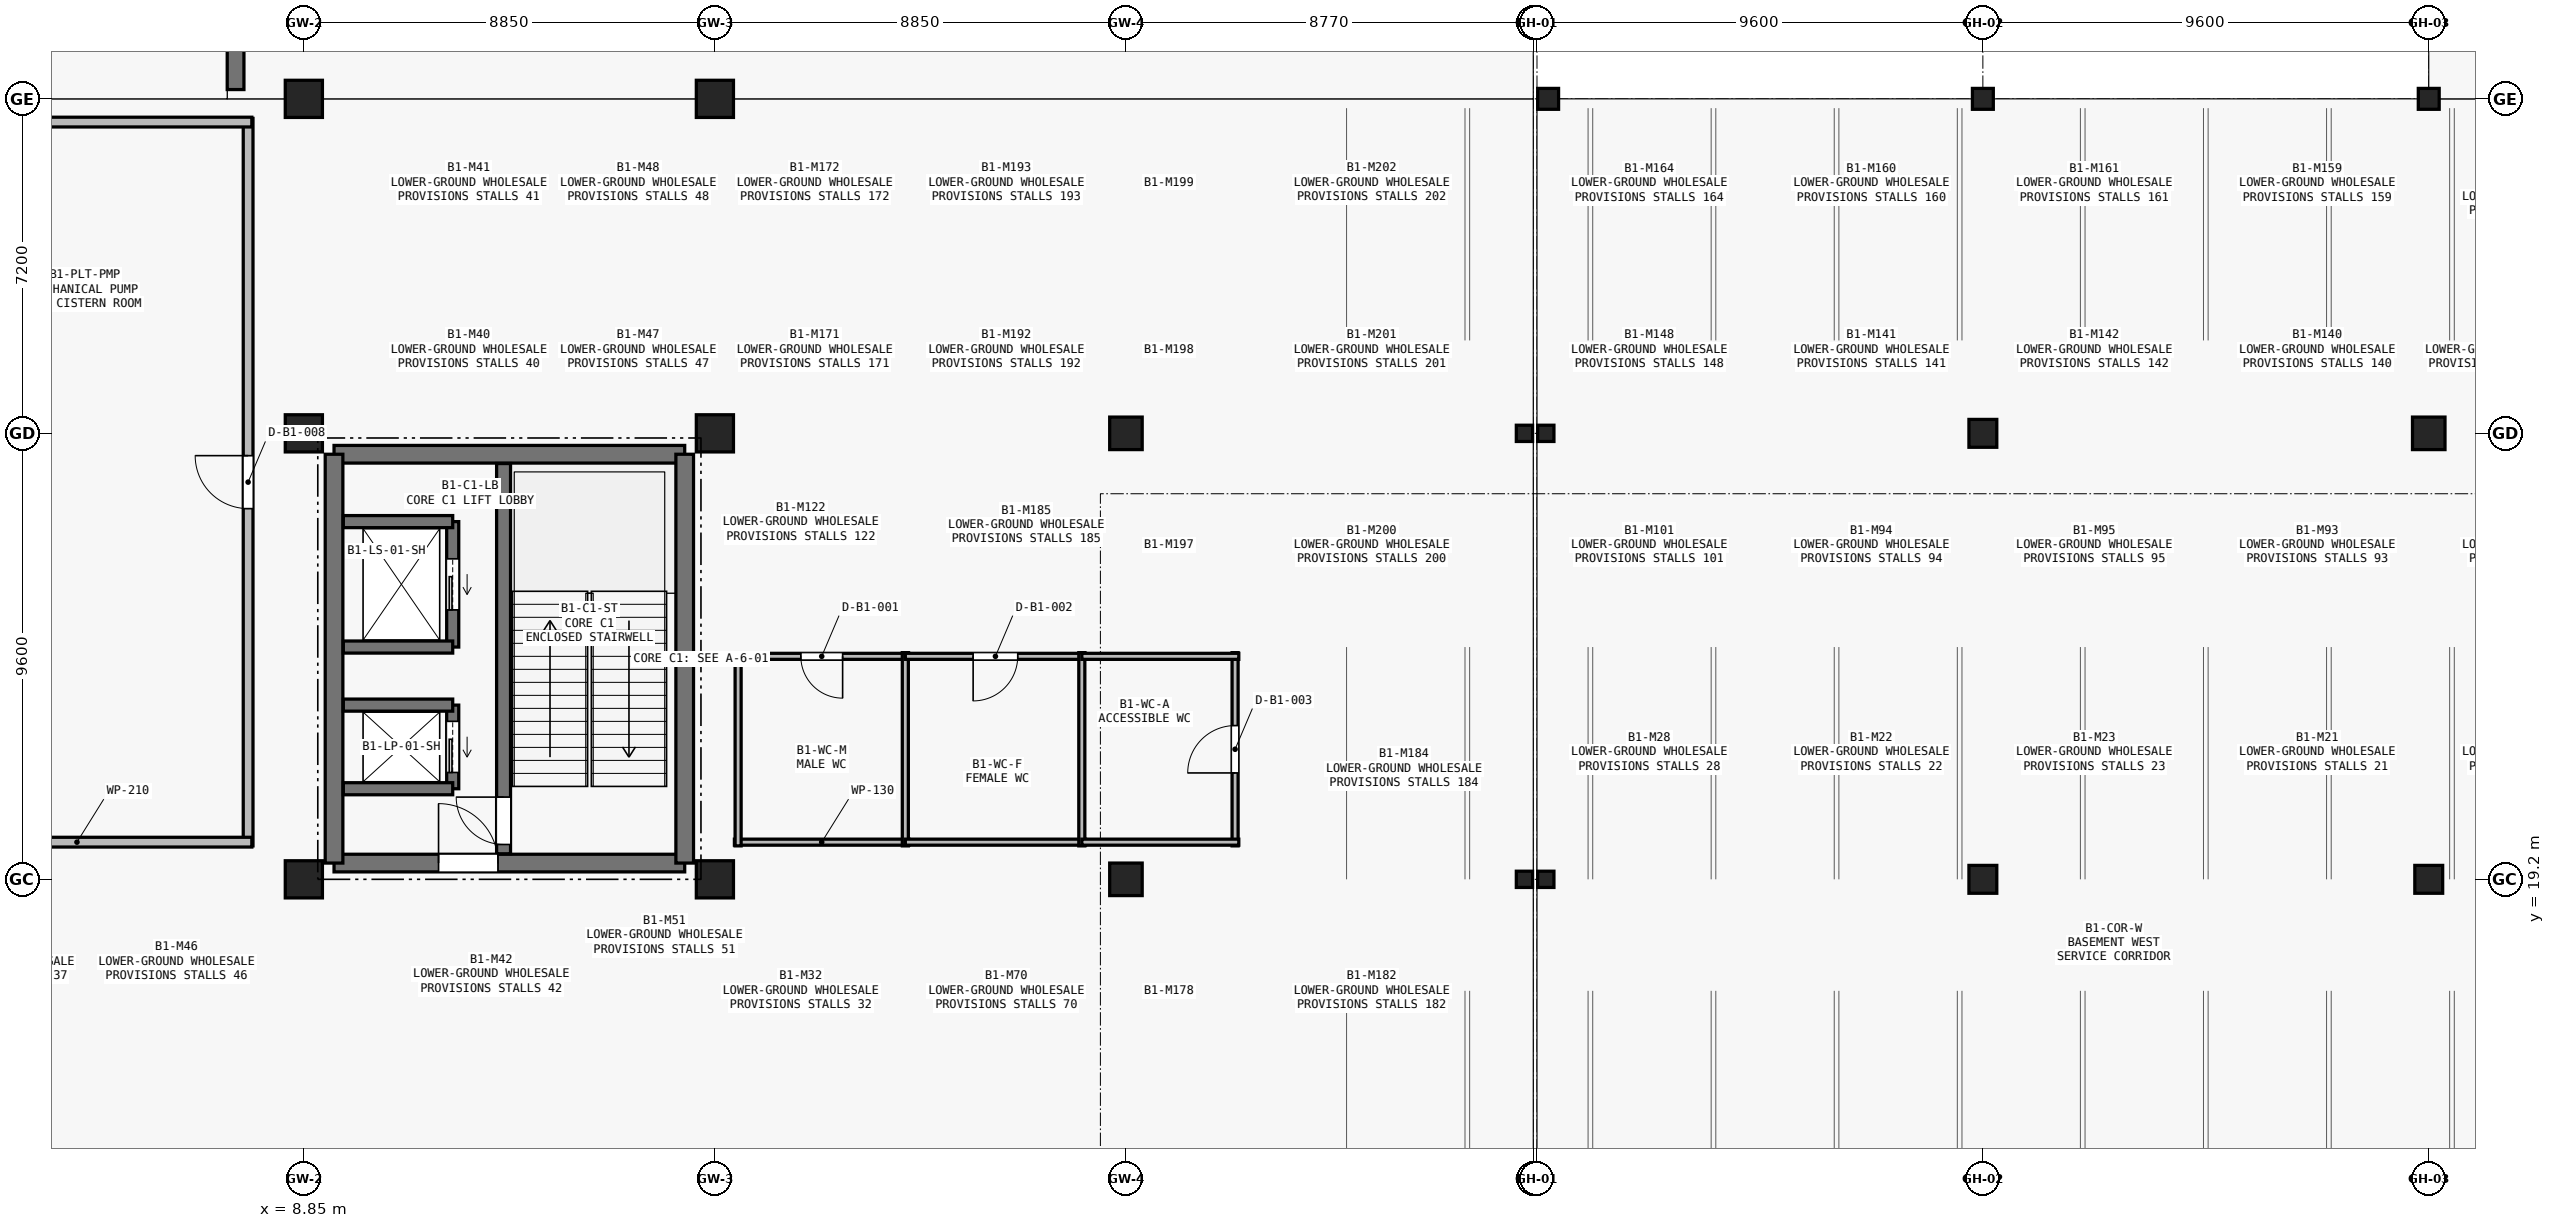
"""IFC4 building model, lengths in metres.
Left out: names, types, materials, properties, quantities, classifications, styles, units other than length and angle.
Written with IfcOpenShell. Run it as: python <this file> out.ifc"""

import sys

from ifc_helpers import new_model, si_unit, direction, frame, frame_2d, origin, origin_2d, place, context, subcontext, project, spatial, rectangle, circle, i_section, extrude, element, fill, save


model = new_model("IFC4")
c1 = context("Model", 3, precision=1e-05, world=origin(), true_north=direction((0.0, 1.0)))
c2 = subcontext(c1, "Body", "Model", "MODEL_VIEW")
j1 = project(units=[si_unit("LENGTHUNIT", "METRE"), si_unit("PLANEANGLEUNIT", "RADIAN")], contexts=[c1])
p1 = place(None, origin())
s1 = spatial("IfcSite", under=j1, at=p1, CompositionType="ELEMENT")
p2 = place(p1, origin())
s2 = spatial("IfcBuilding", under=s1, at=p2, CompositionType="ELEMENT")
p3 = place(p2, frame((0.0, 0.0, -5.4)))
s3 = spatial("IfcBuildingStorey", under=s2, at=p3, CompositionType="ELEMENT", Elevation=-5.4)
for number, where, z_axis, x_axis in (
    (1, (8.85, 19.2, 0.0), (0.0, 0.0, 1.0), (1.0, 0.0, 0.0)),
    (2, (8.85, 28.8, 0.0), (0.0, 0.0, 1.0), (1.0, 0.0, 0.0)),
    (3, (8.85, 36.0, 0.0), (0.0, 0.0, 1.0), (1.0, 0.0, 0.0)),
    (4, (17.7, 19.2, 0.0), (0.0, 0.0, 1.0), (1.0, 0.0, 0.0)),
    (5, (17.7, 28.8, 0.0), (0.0, 0.0, 1.0), (1.0, 0.0, 0.0)),
    (6, (17.7, 36.0, 0.0), (0.0, 0.0, 1.0), (1.0, 0.0, 0.0)),
):
    element("IfcColumn", number, at=place(p3, frame(where, z_axis=z_axis, x_axis=x_axis)), inside=s3, PredefinedType="COLUMN", context=c2, shape_type="SweptSolid", body=[
        extrude(rectangle(XDim=0.8, YDim=0.8, at=origin_2d()), origin(), (0.0, 0.0, 1.0), 5.4),
    ])
for number, where, z_axis, x_axis in (
    (7, (26.55, 19.2, 0.0), (0.0, 0.0, 1.0), (1.0, 0.0, 0.0)),
    (8, (26.55, 28.8, 0.0), (0.0, 0.0, 1.0), (1.0, 0.0, 0.0)),
):
    element("IfcColumn", number, at=place(p3, frame(where, z_axis=z_axis, x_axis=x_axis)), inside=s3, PredefinedType="COLUMN", context=c2, shape_type="SweptSolid", body=[
        extrude(rectangle(XDim=0.7, YDim=0.7, at=origin_2d()), origin(), (0.0, 0.0, 1.0), 5.4),
    ])
for number, where, z_axis, x_axis in (
    (9, (35.13, 19.2, 0.0), (0.0, 0.0, 1.0), (1.0, 0.0, 0.0)),
    (10, (35.13, 28.8, 0.0), (0.0, 0.0, 1.0), (1.0, 0.0, 0.0)),
    (11, (35.59, 19.2, 0.0), (0.0, 0.0, 1.0), (1.0, 0.0, 0.0)),
    (12, (35.59, 28.8, 0.0), (0.0, 0.0, 1.0), (1.0, 0.0, 0.0)),
):
    element("IfcColumn", number, at=place(p3, frame(where, z_axis=z_axis, x_axis=x_axis)), inside=s3, PredefinedType="COLUMN", context=c2, shape_type="SweptSolid", body=[
        extrude(i_section(OverallWidth=0.35, OverallDepth=0.35, WebThickness=0.012, FlangeThickness=0.019, FilletRadius=0.02, at=origin_2d()), origin(), (0.0, 0.0, 1.0), 5.4),
    ])
p4 = place(p3, frame((35.64, 36.0, 0.0), z_axis=(0.0, 0.0, 1.0), x_axis=(1.0, 0.0, 0.0)))
e13 = element("IfcColumn", 13, at=p4, inside=s3, PredefinedType="COLUMN", context=c2, shape_type="SweptSolid", body=[
    extrude(i_section(OverallWidth=0.45, OverallDepth=0.45, WebThickness=0.014, FlangeThickness=0.024, FilletRadius=0.024, at=origin_2d()), origin(), (0.0, 0.0, 1.0), 5.4),
])
for number, where, z_axis, x_axis in (
    (14, (45.0, 19.2, 0.0), (0.0, 0.0, 1.0), (1.0, 0.0, 0.0)),
    (15, (45.0, 28.8, 0.0), (0.0, 0.0, 1.0), (1.0, 0.0, 0.0)),
):
    element("IfcColumn", number, at=place(p3, frame(where, z_axis=z_axis, x_axis=x_axis)), inside=s3, PredefinedType="COLUMN", context=c2, shape_type="SweptSolid", body=[
        extrude(rectangle(XDim=0.6, YDim=0.6, at=origin_2d()), origin(), (0.0, 0.0, 1.0), 5.4),
    ])
p5 = place(p3, frame((45.0, 36.0, 0.0), z_axis=(0.0, 0.0, 1.0), x_axis=(1.0, 0.0, 0.0)))
e16 = element("IfcColumn", 16, at=p5, inside=s3, PredefinedType="COLUMN", context=c2, shape_type="SweptSolid", body=[
    extrude(i_section(OverallWidth=0.45, OverallDepth=0.45, WebThickness=0.014, FlangeThickness=0.024, FilletRadius=0.024, at=origin_2d()), origin(), (0.0, 0.0, 1.0), 5.4),
])
p6 = place(p3, frame((54.6, 19.2, 0.0), z_axis=(0.0, 0.0, 1.0), x_axis=(1.0, 0.0, 0.0)))
e17 = element("IfcColumn", 17, at=p6, inside=s3, PredefinedType="COLUMN", context=c2, shape_type="SweptSolid", body=[
    extrude(rectangle(XDim=0.6, YDim=0.6, at=origin_2d()), origin(), (0.0, 0.0, 1.0), 5.4),
])
p7 = place(p3, frame((54.6, 28.8, 0.0), z_axis=(0.0, 0.0, 1.0), x_axis=(1.0, 0.0, 0.0)))
e18 = element("IfcColumn", 18, at=p7, inside=s3, PredefinedType="COLUMN", context=c2, shape_type="SweptSolid", body=[
    extrude(circle(Radius=0.35, at=origin_2d()), origin(), (0.0, 0.0, 1.0), 5.4),
])
p8 = place(p3, frame((54.6, 36.0, 0.0), z_axis=(0.0, 0.0, 1.0), x_axis=(1.0, 0.0, 0.0)))
e19 = element("IfcColumn", 19, at=p8, inside=s3, PredefinedType="COLUMN", context=c2, shape_type="SweptSolid", body=[
    extrude(i_section(OverallWidth=0.45, OverallDepth=0.45, WebThickness=0.014, FlangeThickness=0.024, FilletRadius=0.024, at=origin_2d()), origin(), (0.0, 0.0, 1.0), 5.4),
])
p9 = place(p3, frame((7.38, 84.2, 0.0), z_axis=(0.0, 0.0, 1.0), x_axis=(0.0, -1.0, 0.0)))
e20 = element("IfcWall", 20, at=p9, inside=s3, PredefinedType="USERDEFINED", context=c2, shape_type="SweptSolid", body=[
    extrude(rectangle(XDim=48.0, YDim=0.36, at=frame_2d((24.0, 0.0))), origin(), (0.0, 0.0, 1.0), 9.0),
])
p10 = place(p3, frame((9.5, 19.55, 0.0), z_axis=(0.0, 0.0, 1.0), x_axis=(1.0, 0.0, 0.0)))
e21 = element("IfcWall", 21, at=p10, inside=s3, PredefinedType="SHEAR", context=c2, shape_type="SweptSolid", body=[
    extrude(rectangle(XDim=7.55, YDim=0.38, at=frame_2d((3.775, 0.0))), origin(), (0.0, 0.0, 1.0), 5.4),
])
p11 = place(p10, frame((2.25, 0.0, 0.0)))
e22 = element("IfcOpeningElement", 22, at=p11, cuts=e21, PredefinedType="OPENING", context=c2, shape_type="SweptSolid", body=[
    extrude(rectangle(XDim=1.28, YDim=2.15, at=frame_2d((0.64, 1.075))), frame((0.0, 0.2, 0.0), z_axis=(0.0, -1.0, 0.0), x_axis=(1.0, 0.0, 0.0)), (0.0, 0.0, 1.0), 0.4),
])
p12 = place(p3, frame((17.05, 28.35, 0.0), z_axis=(0.0, 0.0, 1.0), x_axis=(-1.0, 0.0, 0.0)))
e23 = element("IfcWall", 23, at=p12, inside=s3, PredefinedType="SHEAR", context=c2, shape_type="SweptSolid", body=[
    extrude(rectangle(XDim=7.55, YDim=0.38, at=frame_2d((3.775, 0.0))), origin(), (0.0, 0.0, 1.0), 5.4),
])
for number, where, z_axis, x_axis in (
    (24, (9.5, 28.35, 0.0), (0.0, 0.0, 1.0), (0.0, -1.0, 0.0)),
    (25, (17.05, 19.55, 0.0), (0.0, 0.0, 1.0), (0.0, 1.0, 0.0)),
):
    element("IfcWall", number, at=place(p3, frame(where, z_axis=z_axis, x_axis=x_axis)), inside=s3, PredefinedType="SHEAR", context=c2, shape_type="SweptSolid", body=[
        extrude(rectangle(XDim=8.8, YDim=0.38, at=frame_2d((4.4, 0.0))), origin(), (0.0, 0.0, 1.0), 5.4),
    ])
p13 = place(p3, frame((13.15, 19.75, 0.0), z_axis=(0.0, 0.0, 1.0), x_axis=(0.0, 1.0, 0.0)))
e26 = element("IfcWall", 26, at=p13, inside=s3, PredefinedType="SHEAR", context=c2, shape_type="SweptSolid", body=[
    extrude(rectangle(XDim=8.4, YDim=0.3, at=frame_2d((4.2, 0.0))), origin(), (0.0, 0.0, 1.0), 5.4),
])
p14 = place(p13, frame((0.2, 0.0, 0.0)))
e27 = element("IfcOpeningElement", 27, at=p14, cuts=e26, PredefinedType="OPENING", context=c2, shape_type="SweptSolid", body=[
    extrude(rectangle(XDim=1.02, YDim=2.1, at=frame_2d((0.51, 1.05))), frame((0.0, 0.16, 0.0), z_axis=(0.0, -1.0, 0.0), x_axis=(1.0, 0.0, 0.0)), (0.0, 0.0, 1.0), 0.32),
])
p15 = place(p3, frame((12.055, 21.15, 0.0), z_axis=(0.0, 0.0, 1.0), x_axis=(0.0, 1.0, 0.0)))
e28 = element("IfcWall", 28, at=p15, inside=s3, PredefinedType="SHEAR", context=c2, shape_type="SweptSolid", body=[
    extrude(rectangle(XDim=1.8, YDim=0.26, at=frame_2d((0.9, 0.0))), origin(), (0.0, 0.0, 1.0), 5.4),
])
p16 = place(p15, frame((0.35, 0.0, 0.0)))
e29 = element("IfcOpeningElement", 29, at=p16, cuts=e28, PredefinedType="OPENING", context=c2, shape_type="SweptSolid", body=[
    extrude(rectangle(XDim=1.1, YDim=2.15, at=frame_2d((0.55, 1.075))), frame((0.0, 0.14, 0.0), z_axis=(0.0, -1.0, 0.0), x_axis=(1.0, 0.0, 0.0)), (0.0, 0.0, 1.0), 0.28),
])
for number, where, z_axis, x_axis in (
    (30, (9.7, 21.15, 0.0), (0.0, 0.0, 1.0), (1.0, 0.0, 0.0)),
    (31, (9.7, 22.95, 0.0), (0.0, 0.0, 1.0), (1.0, 0.0, 0.0)),
):
    element("IfcWall", number, at=place(p3, frame(where, z_axis=z_axis, x_axis=x_axis)), inside=s3, PredefinedType="SHEAR", context=c2, shape_type="SweptSolid", body=[
        extrude(rectangle(XDim=2.355, YDim=0.26, at=frame_2d((1.177, 0.0))), origin(), (0.0, 0.0, 1.0), 5.4),
    ])
p17 = place(p3, frame((12.055, 24.2, 0.0), z_axis=(0.0, 0.0, 1.0), x_axis=(0.0, 1.0, 0.0)))
e32 = element("IfcWall", 32, at=p17, inside=s3, PredefinedType="SHEAR", context=c2, shape_type="SweptSolid", body=[
    extrude(rectangle(XDim=2.7, YDim=0.26, at=frame_2d((1.35, 0.0))), origin(), (0.0, 0.0, 1.0), 5.4),
])
p18 = place(p17, frame((0.8, 0.0, 0.0)))
e33 = element("IfcOpeningElement", 33, at=p18, cuts=e32, PredefinedType="OPENING", context=c2, shape_type="SweptSolid", body=[
    extrude(rectangle(XDim=1.1, YDim=2.15, at=frame_2d((0.55, 1.075))), frame((0.0, 0.14, 0.0), z_axis=(0.0, -1.0, 0.0), x_axis=(1.0, 0.0, 0.0)), (0.0, 0.0, 1.0), 0.28),
])
for number, where, z_axis, x_axis in (
    (34, (9.7, 24.2, 0.0), (0.0, 0.0, 1.0), (1.0, 0.0, 0.0)),
    (35, (9.7, 26.9, 0.0), (0.0, 0.0, 1.0), (1.0, 0.0, 0.0)),
):
    element("IfcWall", number, at=place(p3, frame(where, z_axis=z_axis, x_axis=x_axis)), inside=s3, PredefinedType="SHEAR", context=c2, shape_type="SweptSolid", body=[
        extrude(rectangle(XDim=2.355, YDim=0.26, at=frame_2d((1.177, 0.0))), origin(), (0.0, 0.0, 1.0), 5.4),
    ])
p19 = place(p3, frame((21.88, 24.0, 0.0), z_axis=(0.0, 0.0, 1.0), x_axis=(-1.0, 0.0, 0.0)))
e36 = element("IfcWall", 36, at=p19, inside=s3, PredefinedType="PARTITIONING", context=c2, shape_type="SweptSolid", body=[
    extrude(rectangle(XDim=3.76, YDim=0.13, at=frame_2d((1.88, 0.0))), origin(), (0.0, 0.0, 1.0), 4.92),
])
p20 = place(p19, frame((1.43, 0.0, 0.0)))
e37 = element("IfcOpeningElement", 37, at=p20, cuts=e36, PredefinedType="OPENING", context=c2, shape_type="SweptSolid", body=[
    extrude(rectangle(XDim=0.9, YDim=2.22, at=frame_2d((0.45, 1.11))), frame((0.0, 0.075, 0.0), z_axis=(0.0, -1.0, 0.0), x_axis=(1.0, 0.0, 0.0)), (0.0, 0.0, 1.0), 0.15),
])
p21 = place(p3, frame((18.12, 20.0, 0.0), z_axis=(0.0, 0.0, 1.0), x_axis=(1.0, 0.0, 0.0)))
e38 = element("IfcWall", 38, at=p21, inside=s3, PredefinedType="PARTITIONING", context=c2, shape_type="SweptSolid", body=[
    extrude(rectangle(XDim=3.76, YDim=0.13, at=frame_2d((1.88, 0.0))), origin(), (0.0, 0.0, 1.0), 4.92),
])
for number, where, z_axis, x_axis in (
    (39, (21.8, 19.92, 0.0), (0.0, 0.0, 1.0), (0.0, 1.0, 0.0)),
    (40, (18.2, 24.08, 0.0), (0.0, 0.0, 1.0), (0.0, -1.0, 0.0)),
):
    element("IfcWall", number, at=place(p3, frame(where, z_axis=z_axis, x_axis=x_axis)), inside=s3, PredefinedType="PARTITIONING", context=c2, shape_type="SweptSolid", body=[
        extrude(rectangle(XDim=4.16, YDim=0.13, at=frame_2d((2.08, 0.0))), origin(), (0.0, 0.0, 1.0), 4.92),
    ])
p22 = place(p3, frame((25.68, 24.0, 0.0), z_axis=(0.0, 0.0, 1.0), x_axis=(-1.0, 0.0, 0.0)))
e41 = element("IfcWall", 41, at=p22, inside=s3, PredefinedType="PARTITIONING", context=c2, shape_type="SweptSolid", body=[
    extrude(rectangle(XDim=3.88, YDim=0.13, at=frame_2d((1.94, 0.0))), origin(), (0.0, 0.0, 1.0), 4.92),
])
p23 = place(p22, frame((1.46, 0.0, 0.0)))
e42 = element("IfcOpeningElement", 42, at=p23, cuts=e41, PredefinedType="OPENING", context=c2, shape_type="SweptSolid", body=[
    extrude(rectangle(XDim=0.96, YDim=2.22, at=frame_2d((0.48, 1.11))), frame((0.0, 0.075, 0.0), z_axis=(0.0, -1.0, 0.0), x_axis=(1.0, 0.0, 0.0)), (0.0, 0.0, 1.0), 0.15),
])
p24 = place(p3, frame((21.8, 20.0, 0.0), z_axis=(0.0, 0.0, 1.0), x_axis=(1.0, 0.0, 0.0)))
e43 = element("IfcWall", 43, at=p24, inside=s3, PredefinedType="PARTITIONING", context=c2, shape_type="SweptSolid", body=[
    extrude(rectangle(XDim=3.88, YDim=0.13, at=frame_2d((1.94, 0.0))), origin(), (0.0, 0.0, 1.0), 4.92),
])
p25 = place(p3, frame((25.6, 19.92, 0.0), z_axis=(0.0, 0.0, 1.0), x_axis=(0.0, 1.0, 0.0)))
e44 = element("IfcWall", 44, at=p25, inside=s3, PredefinedType="PARTITIONING", context=c2, shape_type="SweptSolid", body=[
    extrude(rectangle(XDim=4.16, YDim=0.13, at=frame_2d((2.08, 0.0))), origin(), (0.0, 0.0, 1.0), 4.92),
])
p26 = place(p3, frame((28.9, 19.92, 0.0), z_axis=(0.0, 0.0, 1.0), x_axis=(0.0, 1.0, 0.0)))
e45 = element("IfcWall", 45, at=p26, inside=s3, PredefinedType="PARTITIONING", context=c2, shape_type="SweptSolid", body=[
    extrude(rectangle(XDim=4.16, YDim=0.13, at=frame_2d((2.08, 0.0))), origin(), (0.0, 0.0, 1.0), 4.92),
])
p27 = place(p26, frame((1.57, 0.0, 0.0)))
e46 = element("IfcOpeningElement", 46, at=p27, cuts=e45, PredefinedType="OPENING", context=c2, shape_type="SweptSolid", body=[
    extrude(rectangle(XDim=1.02, YDim=2.22, at=frame_2d((0.51, 1.11))), frame((0.0, 0.075, 0.0), z_axis=(0.0, -1.0, 0.0), x_axis=(1.0, 0.0, 0.0)), (0.0, 0.0, 1.0), 0.15),
])
for number, where, z_axis, x_axis in (
    (47, (28.98, 24.0, 0.0), (0.0, 0.0, 1.0), (-1.0, 0.0, 0.0)),
    (48, (25.6, 20.0, 0.0), (0.0, 0.0, 1.0), (1.0, 0.0, 0.0)),
):
    element("IfcWall", number, at=place(p3, frame(where, z_axis=z_axis, x_axis=x_axis)), inside=s3, PredefinedType="PARTITIONING", context=c2, shape_type="SweptSolid", body=[
        extrude(rectangle(XDim=3.38, YDim=0.13, at=frame_2d((1.69, 0.0))), origin(), (0.0, 0.0, 1.0), 4.92),
    ])
p28 = place(p3, frame((7.65, 19.92, 0.0), z_axis=(0.0, 0.0, 1.0), x_axis=(0.0, 1.0, 0.0)))
e49 = element("IfcWall", 49, at=p28, inside=s3, PredefinedType="PARTITIONING", context=c2, shape_type="SweptSolid", body=[
    extrude(rectangle(XDim=15.66, YDim=0.21, at=frame_2d((7.83, 0.0))), origin(), (0.0, 0.0, 1.0), 4.92),
])
p29 = place(p28, frame((7.26, 0.0, 0.0)))
e50 = element("IfcOpeningElement", 50, at=p29, cuts=e49, PredefinedType="OPENING", context=c2, shape_type="SweptSolid", body=[
    extrude(rectangle(XDim=1.14, YDim=2.1, at=frame_2d((0.57, 1.05))), frame((0.0, 0.115, 0.0), z_axis=(0.0, -1.0, 0.0), x_axis=(1.0, 0.0, 0.0)), (0.0, 0.0, 1.0), 0.23),
])
for number, where, z_axis, x_axis in (
    (51, (0.2, 20.0, 0.0), (0.0, 0.0, 1.0), (1.0, 0.0, 0.0)),
    (52, (7.73, 35.5, 0.0), (0.0, 0.0, 1.0), (-1.0, 0.0, 0.0)),
):
    element("IfcWall", number, at=place(p3, frame(where, z_axis=z_axis, x_axis=x_axis)), inside=s3, PredefinedType="PARTITIONING", context=c2, shape_type="SweptSolid", body=[
        extrude(rectangle(XDim=7.53, YDim=0.21, at=frame_2d((3.765, 0.0))), origin(), (0.0, 0.0, 1.0), 4.92),
    ])
p30 = place(p11, origin())
e53 = element("IfcDoor", 53, at=p30, inside=s3, OperationType="SINGLE_SWING_LEFT", PredefinedType="DOOR", context=c2, shape_type="SweptSolid", body=[
    extrude(rectangle(XDim=1.28, YDim=2.15, at=frame_2d((0.64, 1.075))), frame((0.0, 0.025, 0.0), z_axis=(0.0, -1.0, 0.0), x_axis=(1.0, 0.0, 0.0)), (0.0, 0.0, 1.0), 0.05),
])
fill(e22, e53)
p31 = place(p14, origin())
e54 = element("IfcDoor", 54, at=p31, inside=s3, OperationType="SINGLE_SWING_RIGHT", PredefinedType="DOOR", context=c2, shape_type="SweptSolid", body=[
    extrude(rectangle(XDim=1.02, YDim=2.1, at=frame_2d((0.51, 1.05))), frame((0.0, 0.025, 0.0), z_axis=(0.0, -1.0, 0.0), x_axis=(1.0, 0.0, 0.0)), (0.0, 0.0, 1.0), 0.05),
])
fill(e27, e54)
p32 = place(p16, origin())
e55 = element("IfcDoor", 55, at=p32, inside=s3, OperationType="SLIDING_TO_LEFT", PredefinedType="DOOR", context=c2, shape_type="SweptSolid", body=[
    extrude(rectangle(XDim=1.1, YDim=2.15, at=frame_2d((0.55, 1.075))), frame((0.0, 0.025, 0.0), z_axis=(0.0, -1.0, 0.0), x_axis=(1.0, 0.0, 0.0)), (0.0, 0.0, 1.0), 0.05),
])
fill(e29, e55)
p33 = place(p18, origin())
e56 = element("IfcDoor", 56, at=p33, inside=s3, OperationType="SLIDING_TO_LEFT", PredefinedType="DOOR", context=c2, shape_type="SweptSolid", body=[
    extrude(rectangle(XDim=1.1, YDim=2.15, at=frame_2d((0.55, 1.075))), frame((0.0, 0.025, 0.0), z_axis=(0.0, -1.0, 0.0), x_axis=(1.0, 0.0, 0.0)), (0.0, 0.0, 1.0), 0.05),
])
fill(e33, e56)
p34 = place(p20, origin())
e57 = element("IfcDoor", 57, at=p34, inside=s3, OperationType="SINGLE_SWING_LEFT", PredefinedType="DOOR", context=c2, shape_type="SweptSolid", body=[
    extrude(rectangle(XDim=0.9, YDim=2.22, at=frame_2d((0.45, 1.11))), frame((0.0, 0.025, 0.0), z_axis=(0.0, -1.0, 0.0), x_axis=(1.0, 0.0, 0.0)), (0.0, 0.0, 1.0), 0.05),
])
fill(e37, e57)
p35 = place(p23, origin())
e58 = element("IfcDoor", 58, at=p35, inside=s3, OperationType="SINGLE_SWING_RIGHT", PredefinedType="DOOR", context=c2, shape_type="SweptSolid", body=[
    extrude(rectangle(XDim=0.96, YDim=2.22, at=frame_2d((0.48, 1.11))), frame((0.0, 0.025, 0.0), z_axis=(0.0, -1.0, 0.0), x_axis=(1.0, 0.0, 0.0)), (0.0, 0.0, 1.0), 0.05),
])
fill(e42, e58)
p36 = place(p27, origin())
e59 = element("IfcDoor", 59, at=p36, inside=s3, OperationType="SINGLE_SWING_LEFT", PredefinedType="DOOR", context=c2, shape_type="SweptSolid", body=[
    extrude(rectangle(XDim=1.02, YDim=2.22, at=frame_2d((0.51, 1.11))), frame((0.0, 0.025, 0.0), z_axis=(0.0, -1.0, 0.0), x_axis=(1.0, 0.0, 0.0)), (0.0, 0.0, 1.0), 0.05),
])
fill(e46, e59)
p37 = place(p29, origin())
e60 = element("IfcDoor", 60, at=p37, inside=s3, OperationType="SINGLE_SWING_RIGHT", PredefinedType="DOOR", context=c2, shape_type="SweptSolid", body=[
    extrude(rectangle(XDim=1.14, YDim=2.1, at=frame_2d((0.57, 1.05))), frame((0.0, 0.025, 0.0), z_axis=(0.0, -1.0, 0.0), x_axis=(1.0, 0.0, 0.0)), (0.0, 0.0, 1.0), 0.05),
])
fill(e50, e60)
save(model, sys.argv[1])
